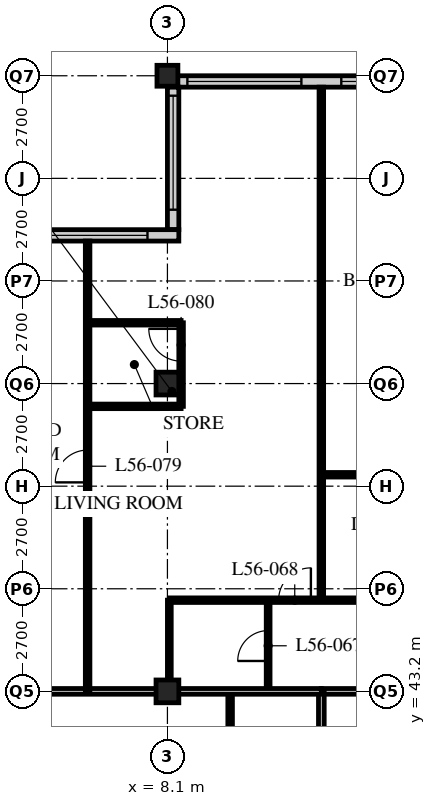
"""IFC4 building model, lengths in metres.
Left out: names, types, materials, properties, quantities, classifications, styles, units other than length and angle.
Written with IfcOpenShell. Run it as: python <this file> out.ifc"""

import sys

from ifc_helpers import new_model, si_unit, direction, frame, frame_2d, origin, origin_2d, place, context, subcontext, project, spatial, rectangle, hollow_rectangle, extrude, element, fill, save


model = new_model("IFC4")
c1 = context("Model", 3, precision=1e-05, world=origin(), true_north=direction((0.0, 1.0)))
c2 = subcontext(c1, "Body", "Model", "MODEL_VIEW")
j1 = project(units=[si_unit("LENGTHUNIT", "METRE"), si_unit("PLANEANGLEUNIT", "RADIAN")], contexts=[c1])
p1 = place(None, origin())
s1 = spatial("IfcSite", under=j1, at=p1, CompositionType="ELEMENT")
p2 = place(p1, origin())
s2 = spatial("IfcBuilding", under=s1, at=p2, CompositionType="ELEMENT")
p3 = place(p2, frame((0.0, 0.0, 217.2)))
s3 = spatial("IfcBuildingStorey", under=s2, at=p3, CompositionType="ELEMENT", Elevation=217.2)
for number, where, z_axis, x_axis in (
    (1, (8.1, 43.2, 0.0), (0.0, 0.0, 1.0), (1.0, 0.0, 0.0)),
    (2, (8.1, 51.3, 0.0), (0.0, 0.0, 1.0), (1.0, 0.0, 0.0)),
):
    element("IfcColumn", number, at=place(p3, frame(where, z_axis=z_axis, x_axis=x_axis)), inside=s3, PredefinedType="COLUMN", context=c2, shape_type="SweptSolid", body=[
        extrude(hollow_rectangle(XDim=0.6, YDim=0.6, WallThickness=0.05, at=origin_2d()), origin(), (0.0, 0.0, 1.0), 3.6),
    ])
p4 = place(p3, frame((8.1, 59.4, 0.0), z_axis=(0.0, 0.0, 1.0), x_axis=(1.0, 0.0, 0.0)))
e3 = element("IfcColumn", 3, at=p4, inside=s3, PredefinedType="COLUMN", context=c2, shape_type="SweptSolid", body=[
    extrude(hollow_rectangle(XDim=0.55, YDim=0.55, WallThickness=0.045, at=origin_2d()), origin(), (0.0, 0.0, 1.0), 3.6),
])
p5 = place(p3, frame((48.3, 59.25, 0.0), z_axis=(0.0, 0.0, 1.0), x_axis=(-1.0, 0.0, 0.0)))
e4 = element("IfcWall", 4, at=p5, inside=s3, PredefinedType="SOLIDWALL", context=c2, shape_type="SweptSolid", body=[
    extrude(rectangle(XDim=40.2, YDim=0.3, at=frame_2d((20.1, 0.0))), origin(), (0.0, 0.0, 1.0), 3.39),
])
p6 = place(p5, frame((0.225, 0.0, 0.6)))
e5 = element("IfcOpeningElement", 5, at=p6, cuts=e4, PredefinedType="OPENING", context=c2, shape_type="SweptSolid", body=[
    extrude(rectangle(XDim=3.0, YDim=2.4, at=frame_2d((1.5, 1.2))), frame((0.0, 0.16, 0.0), z_axis=(0.0, -1.0, 0.0), x_axis=(1.0, 0.0, 0.0)), (0.0, 0.0, 1.0), 0.32),
])
p7 = place(p5, frame((4.275, 0.0, 0.6)))
e6 = element("IfcOpeningElement", 6, at=p7, cuts=e4, PredefinedType="OPENING", context=c2, shape_type="SweptSolid", body=[
    extrude(rectangle(XDim=3.0, YDim=2.4, at=frame_2d((1.5, 1.2))), frame((0.0, 0.16, 0.0), z_axis=(0.0, -1.0, 0.0), x_axis=(1.0, 0.0, 0.0)), (0.0, 0.0, 1.0), 0.32),
])
p8 = place(p5, frame((8.325, 0.0, 0.6)))
e7 = element("IfcOpeningElement", 7, at=p8, cuts=e4, PredefinedType="OPENING", context=c2, shape_type="SweptSolid", body=[
    extrude(rectangle(XDim=3.0, YDim=2.4, at=frame_2d((1.5, 1.2))), frame((0.0, 0.16, 0.0), z_axis=(0.0, -1.0, 0.0), x_axis=(1.0, 0.0, 0.0)), (0.0, 0.0, 1.0), 0.32),
])
p9 = place(p5, frame((12.375, 0.0, 0.6)))
e8 = element("IfcOpeningElement", 8, at=p9, cuts=e4, PredefinedType="OPENING", context=c2, shape_type="SweptSolid", body=[
    extrude(rectangle(XDim=3.0, YDim=2.4, at=frame_2d((1.5, 1.2))), frame((0.0, 0.16, 0.0), z_axis=(0.0, -1.0, 0.0), x_axis=(1.0, 0.0, 0.0)), (0.0, 0.0, 1.0), 0.32),
])
p10 = place(p5, frame((16.425, 0.0, 0.6)))
e9 = element("IfcOpeningElement", 9, at=p10, cuts=e4, PredefinedType="OPENING", context=c2, shape_type="SweptSolid", body=[
    extrude(rectangle(XDim=3.0, YDim=2.4, at=frame_2d((1.5, 1.2))), frame((0.0, 0.16, 0.0), z_axis=(0.0, -1.0, 0.0), x_axis=(1.0, 0.0, 0.0)), (0.0, 0.0, 1.0), 0.32),
])
p11 = place(p5, frame((20.475, 0.0, 0.6)))
e10 = element("IfcOpeningElement", 10, at=p11, cuts=e4, PredefinedType="OPENING", context=c2, shape_type="SweptSolid", body=[
    extrude(rectangle(XDim=3.0, YDim=2.4, at=frame_2d((1.5, 1.2))), frame((0.0, 0.16, 0.0), z_axis=(0.0, -1.0, 0.0), x_axis=(1.0, 0.0, 0.0)), (0.0, 0.0, 1.0), 0.32),
])
p12 = place(p5, frame((24.525, 0.0, 0.6)))
e11 = element("IfcOpeningElement", 11, at=p12, cuts=e4, PredefinedType="OPENING", context=c2, shape_type="SweptSolid", body=[
    extrude(rectangle(XDim=3.0, YDim=2.4, at=frame_2d((1.5, 1.2))), frame((0.0, 0.16, 0.0), z_axis=(0.0, -1.0, 0.0), x_axis=(1.0, 0.0, 0.0)), (0.0, 0.0, 1.0), 0.32),
])
p13 = place(p5, frame((28.575, 0.0, 0.6)))
e12 = element("IfcOpeningElement", 12, at=p13, cuts=e4, PredefinedType="OPENING", context=c2, shape_type="SweptSolid", body=[
    extrude(rectangle(XDim=3.0, YDim=2.4, at=frame_2d((1.5, 1.2))), frame((0.0, 0.16, 0.0), z_axis=(0.0, -1.0, 0.0), x_axis=(1.0, 0.0, 0.0)), (0.0, 0.0, 1.0), 0.32),
])
p14 = place(p5, frame((32.625, 0.0, 0.6)))
e13 = element("IfcOpeningElement", 13, at=p14, cuts=e4, PredefinedType="OPENING", context=c2, shape_type="SweptSolid", body=[
    extrude(rectangle(XDim=3.0, YDim=2.4, at=frame_2d((1.5, 1.2))), frame((0.0, 0.16, 0.0), z_axis=(0.0, -1.0, 0.0), x_axis=(1.0, 0.0, 0.0)), (0.0, 0.0, 1.0), 0.32),
])
p15 = place(p5, frame((36.675, 0.0, 0.6)))
e14 = element("IfcOpeningElement", 14, at=p15, cuts=e4, PredefinedType="OPENING", context=c2, shape_type="SweptSolid", body=[
    extrude(rectangle(XDim=3.0, YDim=2.4, at=frame_2d((1.5, 1.2))), frame((0.0, 0.16, 0.0), z_axis=(0.0, -1.0, 0.0), x_axis=(1.0, 0.0, 0.0)), (0.0, 0.0, 1.0), 0.32),
])
p16 = place(p3, frame((8.25, 59.1, 0.0), z_axis=(0.0, 0.0, 1.0), x_axis=(0.0, -1.0, 0.0)))
e15 = element("IfcWall", 15, at=p16, inside=s3, PredefinedType="SOLIDWALL", context=c2, shape_type="SweptSolid", body=[
    extrude(rectangle(XDim=3.75, YDim=0.3, at=frame_2d((1.875, 0.0))), origin(), (0.0, 0.0, 1.0), 3.39),
])
p17 = place(p16, frame((0.225, 0.0, 0.6)))
e16 = element("IfcOpeningElement", 16, at=p17, cuts=e15, PredefinedType="OPENING", context=c2, shape_type="SweptSolid", body=[
    extrude(rectangle(XDim=3.0, YDim=2.0, at=frame_2d((1.5, 1.0))), frame((0.0, 0.16, 0.0), z_axis=(0.0, -1.0, 0.0), x_axis=(1.0, 0.0, 0.0)), (0.0, 0.0, 1.0), 0.32),
])
p18 = place(p3, frame((8.4, 55.2, 0.0), z_axis=(0.0, 0.0, 1.0), x_axis=(-1.0, 0.0, 0.0)))
e17 = element("IfcWall", 17, at=p18, inside=s3, PredefinedType="SOLIDWALL", context=c2, shape_type="SweptSolid", body=[
    extrude(rectangle(XDim=4.35, YDim=0.3, at=frame_2d((2.175, 0.0))), origin(), (0.0, 0.0, 1.0), 3.39),
])
p19 = place(p18, frame((0.825, 0.0, 0.6)))
e18 = element("IfcOpeningElement", 18, at=p19, cuts=e17, PredefinedType="OPENING", context=c2, shape_type="SweptSolid", body=[
    extrude(rectangle(XDim=3.0, YDim=2.0, at=frame_2d((1.5, 1.0))), frame((0.0, 0.16, 0.0), z_axis=(0.0, -1.0, 0.0), x_axis=(1.0, 0.0, 0.0)), (0.0, 0.0, 1.0), 0.32),
])
p20 = place(p3, frame((12.15, 43.2, 0.0), z_axis=(0.0, 0.0, 1.0), x_axis=(1.0, 0.0, 0.0)))
e19 = element("IfcWall", 19, at=p20, inside=s3, PredefinedType="PARTITIONING", context=c2, shape_type="SweptSolid", body=[
    extrude(rectangle(XDim=36.45, YDim=0.15, at=frame_2d((18.225, 0.0))), origin(), (0.0, 0.0, 1.0), 2.778),
])
p21 = place(p20, frame((4.95, 0.0, 0.0)))
e20 = element("IfcOpeningElement", 20, at=p21, cuts=e19, PredefinedType="OPENING", context=c2, shape_type="SweptSolid", body=[
    extrude(rectangle(XDim=1.0, YDim=2.1, at=frame_2d((0.5, 1.05))), frame((0.0, 0.085, 0.0), z_axis=(0.0, -1.0, 0.0), x_axis=(1.0, 0.0, 0.0)), (0.0, 0.0, 1.0), 0.17),
])
p22 = place(p20, frame((25.0, 0.0, 0.0)))
e21 = element("IfcOpeningElement", 21, at=p22, cuts=e19, PredefinedType="OPENING", context=c2, shape_type="SweptSolid", body=[
    extrude(rectangle(XDim=1.0, YDim=2.1, at=frame_2d((0.5, 1.05))), frame((0.0, 0.085, 0.0), z_axis=(0.0, -1.0, 0.0), x_axis=(1.0, 0.0, 0.0)), (0.0, 0.0, 1.0), 0.17),
])
p23 = place(p20, frame((30.7, 0.0, 0.0)))
e22 = element("IfcOpeningElement", 22, at=p23, cuts=e19, PredefinedType="OPENING", context=c2, shape_type="SweptSolid", body=[
    extrude(rectangle(XDim=1.0, YDim=2.1, at=frame_2d((0.5, 1.05))), frame((0.0, 0.085, 0.0), z_axis=(0.0, -1.0, 0.0), x_axis=(1.0, 0.0, 0.0)), (0.0, 0.0, 1.0), 0.17),
])
p24 = place(p20, frame((33.925, 0.0, 0.0)))
e23 = element("IfcOpeningElement", 23, at=p24, cuts=e19, PredefinedType="OPENING", context=c2, shape_type="SweptSolid", body=[
    extrude(rectangle(XDim=1.0, YDim=2.1, at=frame_2d((0.5, 1.05))), frame((0.0, 0.085, 0.0), z_axis=(0.0, -1.0, 0.0), x_axis=(1.0, 0.0, 0.0)), (0.0, 0.0, 1.0), 0.17),
])
p25 = place(p20, frame((1.525, 0.0, 0.0)))
e24 = element("IfcOpeningElement", 24, at=p25, cuts=e19, PredefinedType="OPENING", context=c2, shape_type="SweptSolid", body=[
    extrude(rectangle(XDim=1.0, YDim=2.1, at=frame_2d((0.5, 1.05))), frame((0.0, 0.085, 0.0), z_axis=(0.0, -1.0, 0.0), x_axis=(1.0, 0.0, 0.0)), (0.0, 0.0, 1.0), 0.17),
])
p26 = place(p3, frame((12.15, 18.9, 0.0), z_axis=(0.0, 0.0, 1.0), x_axis=(0.0, 1.0, 0.0)))
e25 = element("IfcWall", 25, at=p26, inside=s3, PredefinedType="PARTITIONING", context=c2, shape_type="SweptSolid", body=[
    extrude(rectangle(XDim=24.3, YDim=0.15, at=frame_2d((12.15, 0.0))), origin(), (0.0, 0.0, 1.0), 3.39),
])
p27 = place(p26, frame((0.4, 0.0, 0.0)))
e26 = element("IfcOpeningElement", 26, at=p27, cuts=e25, PredefinedType="OPENING", context=c2, shape_type="SweptSolid", body=[
    extrude(rectangle(XDim=1.0, YDim=2.1, at=frame_2d((0.5, 1.05))), frame((0.0, 0.085, 0.0), z_axis=(0.0, -1.0, 0.0), x_axis=(1.0, 0.0, 0.0)), (0.0, 0.0, 1.0), 0.17),
])
p28 = place(p26, frame((16.6, 0.0, 0.0)))
e27 = element("IfcOpeningElement", 27, at=p28, cuts=e25, PredefinedType="OPENING", context=c2, shape_type="SweptSolid", body=[
    extrude(rectangle(XDim=1.0, YDim=2.1, at=frame_2d((0.5, 1.05))), frame((0.0, 0.085, 0.0), z_axis=(0.0, -1.0, 0.0), x_axis=(1.0, 0.0, 0.0)), (0.0, 0.0, 1.0), 0.17),
])
p29 = place(p3, frame((9.75, 18.9, 0.0), z_axis=(0.0, 0.0, 1.0), x_axis=(0.0, 1.0, 0.0)))
e28 = element("IfcWall", 28, at=p29, inside=s3, PredefinedType="PARTITIONING", context=c2, shape_type="SweptSolid", body=[
    extrude(rectangle(XDim=24.3, YDim=0.12, at=frame_2d((12.15, 0.0))), origin(), (0.0, 0.0, 1.0), 3.39),
])
p30 = place(p29, frame((0.975, 0.0, 0.0)))
e29 = element("IfcOpeningElement", 29, at=p30, cuts=e28, PredefinedType="OPENING", context=c2, shape_type="SweptSolid", body=[
    extrude(rectangle(XDim=0.85, YDim=2.1, at=frame_2d((0.425, 1.05))), frame((0.0, 0.07, 0.0), z_axis=(0.0, -1.0, 0.0), x_axis=(1.0, 0.0, 0.0)), (0.0, 0.0, 1.0), 0.14),
])
p31 = place(p29, frame((8.425, 0.0, 0.0)))
e30 = element("IfcOpeningElement", 30, at=p31, cuts=e28, PredefinedType="OPENING", context=c2, shape_type="SweptSolid", body=[
    extrude(rectangle(XDim=0.85, YDim=2.1, at=frame_2d((0.425, 1.05))), frame((0.0, 0.07, 0.0), z_axis=(0.0, -1.0, 0.0), x_axis=(1.0, 0.0, 0.0)), (0.0, 0.0, 1.0), 0.14),
])
p32 = place(p29, frame((12.475, 0.0, 0.0)))
e31 = element("IfcOpeningElement", 31, at=p32, cuts=e28, PredefinedType="OPENING", context=c2, shape_type="SweptSolid", body=[
    extrude(rectangle(XDim=0.85, YDim=2.1, at=frame_2d((0.425, 1.05))), frame((0.0, 0.07, 0.0), z_axis=(0.0, -1.0, 0.0), x_axis=(1.0, 0.0, 0.0)), (0.0, 0.0, 1.0), 0.14),
])
p33 = place(p29, frame((17.175, 0.0, 0.0)))
e32 = element("IfcOpeningElement", 32, at=p33, cuts=e28, PredefinedType="OPENING", context=c2, shape_type="SweptSolid", body=[
    extrude(rectangle(XDim=0.85, YDim=2.1, at=frame_2d((0.425, 1.05))), frame((0.0, 0.07, 0.0), z_axis=(0.0, -1.0, 0.0), x_axis=(1.0, 0.0, 0.0)), (0.0, 0.0, 1.0), 0.14),
])
p34 = place(p29, frame((20.575, 0.0, 0.0)))
e33 = element("IfcOpeningElement", 33, at=p34, cuts=e28, PredefinedType="OPENING", context=c2, shape_type="SweptSolid", body=[
    extrude(rectangle(XDim=0.85, YDim=2.1, at=frame_2d((0.425, 1.05))), frame((0.0, 0.07, 0.0), z_axis=(0.0, -1.0, 0.0), x_axis=(1.0, 0.0, 0.0)), (0.0, 0.0, 1.0), 0.14),
])
p35 = place(p3, frame((10.75, 43.2, 0.0), z_axis=(0.0, 0.0, 1.0), x_axis=(0.0, 1.0, 0.0)))
e34 = element("IfcWall", 34, at=p35, inside=s3, PredefinedType="PARTITIONING", context=c2, shape_type="SweptSolid", body=[
    extrude(rectangle(XDim=2.4, YDim=0.1, at=frame_2d((1.2, 0.0))), origin(), (0.0, 0.0, 1.0), 3.39),
])
p36 = place(p35, frame((0.8, 0.0, 0.0)))
e35 = element("IfcOpeningElement", 35, at=p36, cuts=e34, PredefinedType="OPENING", context=c2, shape_type="SweptSolid", body=[
    extrude(rectangle(XDim=0.8, YDim=2.1, at=frame_2d((0.4, 1.05))), frame((0.0, 0.06, 0.0), z_axis=(0.0, -1.0, 0.0), x_axis=(1.0, 0.0, 0.0)), (0.0, 0.0, 1.0), 0.12),
])
p37 = place(p3, frame((8.15, 43.2, 0.0), z_axis=(0.0, 0.0, 1.0), x_axis=(0.0, 1.0, 0.0)))
e36 = element("IfcWall", 36, at=p37, inside=s3, PredefinedType="PARTITIONING", context=c2, shape_type="SweptSolid", body=[
    extrude(rectangle(XDim=2.4, YDim=0.1, at=frame_2d((1.2, 0.0))), origin(), (0.0, 0.0, 1.0), 2.778),
])
p38 = place(p3, frame((8.15, 45.6, 0.0), z_axis=(0.0, 0.0, 1.0), x_axis=(1.0, 0.0, 0.0)))
e37 = element("IfcWall", 37, at=p38, inside=s3, PredefinedType="PARTITIONING", context=c2, shape_type="SweptSolid", body=[
    extrude(rectangle(XDim=28.3, YDim=0.12, at=frame_2d((14.15, 0.0))), origin(), (0.0, 0.0, 1.0), 3.39),
])
p39 = place(p38, frame((9.025, 0.0, 0.0)))
e38 = element("IfcOpeningElement", 38, at=p39, cuts=e37, PredefinedType="OPENING", context=c2, shape_type="SweptSolid", body=[
    extrude(rectangle(XDim=0.85, YDim=2.1, at=frame_2d((0.425, 1.05))), frame((0.0, 0.07, 0.0), z_axis=(0.0, -1.0, 0.0), x_axis=(1.0, 0.0, 0.0)), (0.0, 0.0, 1.0), 0.14),
])
p40 = place(p38, frame((16.475, 0.0, 0.0)))
e39 = element("IfcOpeningElement", 39, at=p40, cuts=e37, PredefinedType="OPENING", context=c2, shape_type="SweptSolid", body=[
    extrude(rectangle(XDim=0.85, YDim=2.1, at=frame_2d((0.425, 1.05))), frame((0.0, 0.07, 0.0), z_axis=(0.0, -1.0, 0.0), x_axis=(1.0, 0.0, 0.0)), (0.0, 0.0, 1.0), 0.14),
])
p41 = place(p38, frame((20.525, 0.0, 0.0)))
e40 = element("IfcOpeningElement", 40, at=p41, cuts=e37, PredefinedType="OPENING", context=c2, shape_type="SweptSolid", body=[
    extrude(rectangle(XDim=0.85, YDim=2.1, at=frame_2d((0.425, 1.05))), frame((0.0, 0.07, 0.0), z_axis=(0.0, -1.0, 0.0), x_axis=(1.0, 0.0, 0.0)), (0.0, 0.0, 1.0), 0.14),
])
p42 = place(p38, frame((24.575, 0.0, 0.0)))
e41 = element("IfcOpeningElement", 41, at=p42, cuts=e37, PredefinedType="OPENING", context=c2, shape_type="SweptSolid", body=[
    extrude(rectangle(XDim=0.85, YDim=2.1, at=frame_2d((0.425, 1.05))), frame((0.0, 0.07, 0.0), z_axis=(0.0, -1.0, 0.0), x_axis=(1.0, 0.0, 0.0)), (0.0, 0.0, 1.0), 0.14),
])
p43 = place(p38, frame((6.725, 0.0, 0.0)))
e42 = element("IfcOpeningElement", 42, at=p43, cuts=e37, PredefinedType="OPENING", context=c2, shape_type="SweptSolid", body=[
    extrude(rectangle(XDim=0.85, YDim=2.1, at=frame_2d((0.425, 1.05))), frame((0.0, 0.07, 0.0), z_axis=(0.0, -1.0, 0.0), x_axis=(1.0, 0.0, 0.0)), (0.0, 0.0, 1.0), 0.14),
])
p44 = place(p38, frame((2.875, 0.0, 0.0)))
e43 = element("IfcOpeningElement", 43, at=p44, cuts=e37, PredefinedType="OPENING", context=c2, shape_type="SweptSolid", body=[
    extrude(rectangle(XDim=0.85, YDim=2.1, at=frame_2d((0.425, 1.05))), frame((0.0, 0.07, 0.0), z_axis=(0.0, -1.0, 0.0), x_axis=(1.0, 0.0, 0.0)), (0.0, 0.0, 1.0), 0.14),
])
p45 = place(p3, frame((12.15, 45.6, 0.0), z_axis=(0.0, 0.0, 1.0), x_axis=(0.0, 1.0, 0.0)))
e44 = element("IfcWall", 44, at=p45, inside=s3, PredefinedType="PARTITIONING", context=c2, shape_type="SweptSolid", body=[
    extrude(rectangle(XDim=13.5, YDim=0.12, at=frame_2d((6.75, 0.0))), origin(), (0.0, 0.0, 1.0), 3.39),
])
p46 = place(p3, frame((0.3, 43.2, 0.0), z_axis=(0.0, 0.0, 1.0), x_axis=(1.0, 0.0, 0.0)))
e45 = element("IfcWall", 45, at=p46, inside=s3, PredefinedType="PARTITIONING", context=c2, shape_type="SweptSolid", body=[
    extrude(rectangle(XDim=11.85, YDim=0.15, at=frame_2d((5.925, 0.0))), origin(), (0.0, 0.0, 1.0), 2.778),
])
p47 = place(p3, frame((12.15, 48.9, 0.0), z_axis=(0.0, 0.0, 1.0), x_axis=(1.0, 0.0, 0.0)))
e46 = element("IfcWall", 46, at=p47, inside=s3, PredefinedType="PARTITIONING", context=c2, shape_type="SweptSolid", body=[
    extrude(rectangle(XDim=4.05, YDim=0.12, at=frame_2d((2.025, 0.0))), origin(), (0.0, 0.0, 1.0), 3.39),
])
p48 = place(p47, frame((1.6, 0.0, 0.0)))
e47 = element("IfcOpeningElement", 47, at=p48, cuts=e46, PredefinedType="OPENING", context=c2, shape_type="SweptSolid", body=[
    extrude(rectangle(XDim=0.85, YDim=2.1, at=frame_2d((0.425, 1.05))), frame((0.0, 0.07, 0.0), z_axis=(0.0, -1.0, 0.0), x_axis=(1.0, 0.0, 0.0)), (0.0, 0.0, 1.0), 0.14),
])
p49 = place(p3, frame((6.0, 43.2, 0.0), z_axis=(0.0, 0.0, 1.0), x_axis=(0.0, 1.0, 0.0)))
e48 = element("IfcWall", 48, at=p49, inside=s3, PredefinedType="PARTITIONING", context=c2, shape_type="SweptSolid", body=[
    extrude(rectangle(XDim=11.85, YDim=0.12, at=frame_2d((5.925, 0.0))), origin(), (0.0, 0.0, 1.0), 3.39),
])
p50 = place(p49, frame((5.5, 0.0, 0.0)))
e49 = element("IfcOpeningElement", 49, at=p50, cuts=e48, PredefinedType="OPENING", context=c2, shape_type="SweptSolid", body=[
    extrude(rectangle(XDim=0.85, YDim=2.1, at=frame_2d((0.425, 1.05))), frame((0.0, 0.07, 0.0), z_axis=(0.0, -1.0, 0.0), x_axis=(1.0, 0.0, 0.0)), (0.0, 0.0, 1.0), 0.14),
])
for number, where, z_axis, x_axis in (
    (50, (6.0, 50.7, 0.0), (0.0, 0.0, 1.0), (1.0, 0.0, 0.0)),
    (51, (6.0, 52.9, 0.0), (0.0, 0.0, 1.0), (1.0, 0.0, 0.0)),
):
    element("IfcWall", number, at=place(p3, frame(where, z_axis=z_axis, x_axis=x_axis)), inside=s3, PredefinedType="PARTITIONING", context=c2, shape_type="SweptSolid", body=[
        extrude(rectangle(XDim=2.46, YDim=0.12, at=frame_2d((1.23, 0.0))), origin(), (0.0, 0.0, 1.0), 3.39),
    ])
p51 = place(p3, frame((8.46, 50.7, 0.0), z_axis=(0.0, 0.0, 1.0), x_axis=(0.0, 1.0, 0.0)))
e52 = element("IfcWall", 52, at=p51, inside=s3, PredefinedType="PARTITIONING", context=c2, shape_type="SweptSolid", body=[
    extrude(rectangle(XDim=2.2, YDim=0.12, at=frame_2d((1.1, 0.0))), origin(), (0.0, 0.0, 1.0), 3.39),
])
p52 = place(p51, frame((1.19, 0.0, 0.0)))
e53 = element("IfcOpeningElement", 53, at=p52, cuts=e52, PredefinedType="OPENING", context=c2, shape_type="SweptSolid", body=[
    extrude(rectangle(XDim=0.85, YDim=2.1, at=frame_2d((0.425, 1.05))), frame((0.0, 0.07, 0.0), z_axis=(0.0, -1.0, 0.0), x_axis=(1.0, 0.0, 0.0)), (0.0, 0.0, 1.0), 0.14),
])
p53 = place(p14, origin())
e54 = element("IfcWindow", 54, at=p53, inside=s3, PartitioningType="SINGLE_PANEL", PredefinedType="WINDOW", context=c2, shape_type="SweptSolid", body=[
    extrude(rectangle(XDim=3.0, YDim=2.4, at=frame_2d((1.5, 1.2))), frame((0.0, 0.03, 0.0), z_axis=(0.0, -1.0, 0.0), x_axis=(1.0, 0.0, 0.0)), (0.0, 0.0, 1.0), 0.06),
])
fill(e13, e54)
p54 = place(p15, origin())
e55 = element("IfcWindow", 55, at=p54, inside=s3, PartitioningType="SINGLE_PANEL", PredefinedType="WINDOW", context=c2, shape_type="SweptSolid", body=[
    extrude(rectangle(XDim=3.0, YDim=2.4, at=frame_2d((1.5, 1.2))), frame((0.0, 0.03, 0.0), z_axis=(0.0, -1.0, 0.0), x_axis=(1.0, 0.0, 0.0)), (0.0, 0.0, 1.0), 0.06),
])
fill(e14, e55)
p55 = place(p17, origin())
e56 = element("IfcWindow", 56, at=p55, inside=s3, PartitioningType="SINGLE_PANEL", PredefinedType="WINDOW", context=c2, shape_type="SweptSolid", body=[
    extrude(rectangle(XDim=3.0, YDim=2.0, at=frame_2d((1.5, 1.0))), frame((0.0, 0.03, 0.0), z_axis=(0.0, -1.0, 0.0), x_axis=(1.0, 0.0, 0.0)), (0.0, 0.0, 1.0), 0.06),
])
fill(e16, e56)
p56 = place(p19, origin())
e57 = element("IfcWindow", 57, at=p56, inside=s3, PartitioningType="SINGLE_PANEL", PredefinedType="WINDOW", context=c2, shape_type="SweptSolid", body=[
    extrude(rectangle(XDim=3.0, YDim=2.0, at=frame_2d((1.5, 1.0))), frame((0.0, 0.03, 0.0), z_axis=(0.0, -1.0, 0.0), x_axis=(1.0, 0.0, 0.0)), (0.0, 0.0, 1.0), 0.06),
])
fill(e18, e57)
p57 = place(p36, origin())
e58 = element("IfcDoor", 58, at=p57, inside=s3, OperationType="SINGLE_SWING_LEFT", PredefinedType="DOOR", context=c2, shape_type="SweptSolid", body=[
    extrude(rectangle(XDim=0.8, YDim=2.1, at=frame_2d((0.4, 1.05))), frame((0.0, 0.025, 0.0), z_axis=(0.0, -1.0, 0.0), x_axis=(1.0, 0.0, 0.0)), (0.0, 0.0, 1.0), 0.05),
])
fill(e35, e58)
p58 = place(p44, origin())
e59 = element("IfcDoor", 59, at=p58, inside=s3, OperationType="SINGLE_SWING_RIGHT", PredefinedType="DOOR", context=c2, shape_type="SweptSolid", body=[
    extrude(rectangle(XDim=0.85, YDim=2.1, at=frame_2d((0.425, 1.05))), frame((0.0, 0.025, 0.0), z_axis=(0.0, -1.0, 0.0), x_axis=(1.0, 0.0, 0.0)), (0.0, 0.0, 1.0), 0.05),
])
fill(e43, e59)
p59 = place(p50, origin())
e60 = element("IfcDoor", 60, at=p59, inside=s3, OperationType="SINGLE_SWING_LEFT", PredefinedType="DOOR", context=c2, shape_type="SweptSolid", body=[
    extrude(rectangle(XDim=0.85, YDim=2.1, at=frame_2d((0.425, 1.05))), frame((0.0, 0.025, 0.0), z_axis=(0.0, -1.0, 0.0), x_axis=(1.0, 0.0, 0.0)), (0.0, 0.0, 1.0), 0.05),
])
fill(e49, e60)
p60 = place(p52, origin())
e61 = element("IfcDoor", 61, at=p60, inside=s3, OperationType="SINGLE_SWING_RIGHT", PredefinedType="DOOR", context=c2, shape_type="SweptSolid", body=[
    extrude(rectangle(XDim=0.85, YDim=2.1, at=frame_2d((0.425, 1.05))), frame((0.0, 0.025, 0.0), z_axis=(0.0, -1.0, 0.0), x_axis=(1.0, 0.0, 0.0)), (0.0, 0.0, 1.0), 0.05),
])
fill(e53, e61)
save(model, sys.argv[1])
